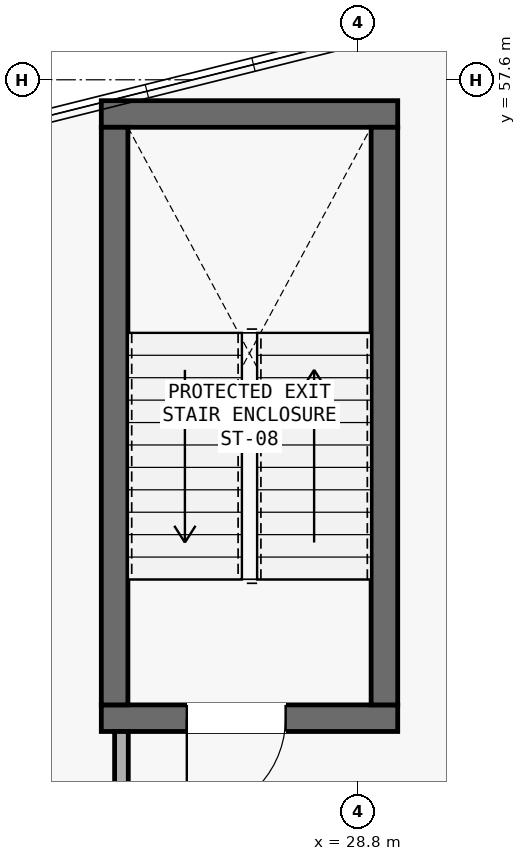
"""IFC4 building model, lengths in metres.
Left out: names, types, materials, properties, quantities, classifications, styles, units other than length and angle.
Written with IfcOpenShell. Run it as: python <this file> out.ifc"""

import sys

from ifc_helpers import new_model, si_unit, direction, frame, frame_2d, origin, place, context, subcontext, project, spatial, rectangle, extrude, element, fill, save


model = new_model("IFC4")
c1 = context("Model", 3, precision=1e-05, world=origin(), true_north=direction((0.0, 1.0)))
c2 = subcontext(c1, "Body", "Model", "MODEL_VIEW")
j1 = project(units=[si_unit("LENGTHUNIT", "METRE"), si_unit("PLANEANGLEUNIT", "RADIAN")], contexts=[c1])
p1 = place(None, origin())
s1 = spatial("IfcSite", under=j1, at=p1, CompositionType="ELEMENT")
p2 = place(p1, origin())
s2 = spatial("IfcBuilding", under=s1, at=p2, CompositionType="ELEMENT")
p3 = place(p2, frame((0.0, 0.0, 13.65)))
s3 = spatial("IfcBuildingStorey", under=s2, at=p3, CompositionType="ELEMENT", Elevation=13.65)
p4 = place(p3, frame((25.425, 49.2, 0.0), z_axis=(0.0, 0.0, 1.0), x_axis=(1.0, 0.0, 0.0)))
e1 = element("IfcWall", 1, at=p4, inside=s3, PredefinedType="SHEAR", context=c2, shape_type="SweptSolid", body=[
    extrude(rectangle(XDim=3.9, YDim=0.35, at=frame_2d((1.95, 0.0))), origin(), (0.0, 0.0, 1.0), 3.98),
])
p5 = place(p4, frame((1.125, 0.0, 0.0)))
e2 = element("IfcOpeningElement", 2, at=p5, cuts=e1, PredefinedType="OPENING", context=c2, shape_type="SweptSolid", body=[
    extrude(rectangle(XDim=1.3, YDim=2.15, at=frame_2d((0.65, 1.075))), frame((0.0, 0.185, 0.0), z_axis=(0.0, -1.0, 0.0), x_axis=(1.0, 0.0, 0.0)), (0.0, 0.0, 1.0), 0.37),
])
p6 = place(p3, frame((25.425, 57.15, 0.0), z_axis=(0.0, 0.0, 1.0), x_axis=(1.0, 0.0, 0.0)))
e3 = element("IfcWall", 3, at=p6, inside=s3, PredefinedType="SHEAR", context=c2, shape_type="SweptSolid", body=[
    extrude(rectangle(XDim=3.9, YDim=0.35, at=frame_2d((1.95, 0.0))), origin(), (0.0, 0.0, 1.0), 3.98),
])
for number, where, z_axis, x_axis in (
    (4, (25.6, 49.375, 0.0), (0.0, 0.0, 1.0), (0.0, 1.0, 0.0)),
    (5, (29.15, 49.375, 0.0), (0.0, 0.0, 1.0), (0.0, 1.0, 0.0)),
):
    element("IfcWall", number, at=place(p3, frame(where, z_axis=z_axis, x_axis=x_axis)), inside=s3, PredefinedType="SHEAR", context=c2, shape_type="SweptSolid", body=[
        extrude(rectangle(XDim=7.6, YDim=0.35, at=frame_2d((3.8, 0.0))), origin(), (0.0, 0.0, 1.0), 3.98),
    ])
p7 = place(p3, frame((25.69, 45.65, 0.0), z_axis=(0.0, 0.0, 1.0), x_axis=(0.0, 1.0, 0.0)))
e6 = element("IfcWall", 6, at=p7, inside=s3, PredefinedType="PARTITIONING", context=c2, shape_type="SweptSolid", body=[
    extrude(rectangle(XDim=3.375, YDim=0.18, at=frame_2d((1.688, 0.0))), origin(), (0.0, 0.0, 1.0), 3.98),
])
p8 = place(p5, frame((1.3, 0.0, 0.0), z_axis=(0.0, 0.0, 1.0), x_axis=(-1.0, 0.0, 0.0)))
e7 = element("IfcDoor", 7, at=p8, inside=s3, OperationType="SINGLE_SWING_LEFT", PredefinedType="DOOR", context=c2, shape_type="SweptSolid", body=[
    extrude(rectangle(XDim=1.3, YDim=2.15, at=frame_2d((0.65, 1.075))), frame((0.0, 0.025, 0.0), z_axis=(0.0, -1.0, 0.0), x_axis=(1.0, 0.0, 0.0)), (0.0, 0.0, 1.0), 0.05),
])
fill(e2, e7)
save(model, sys.argv[1])
